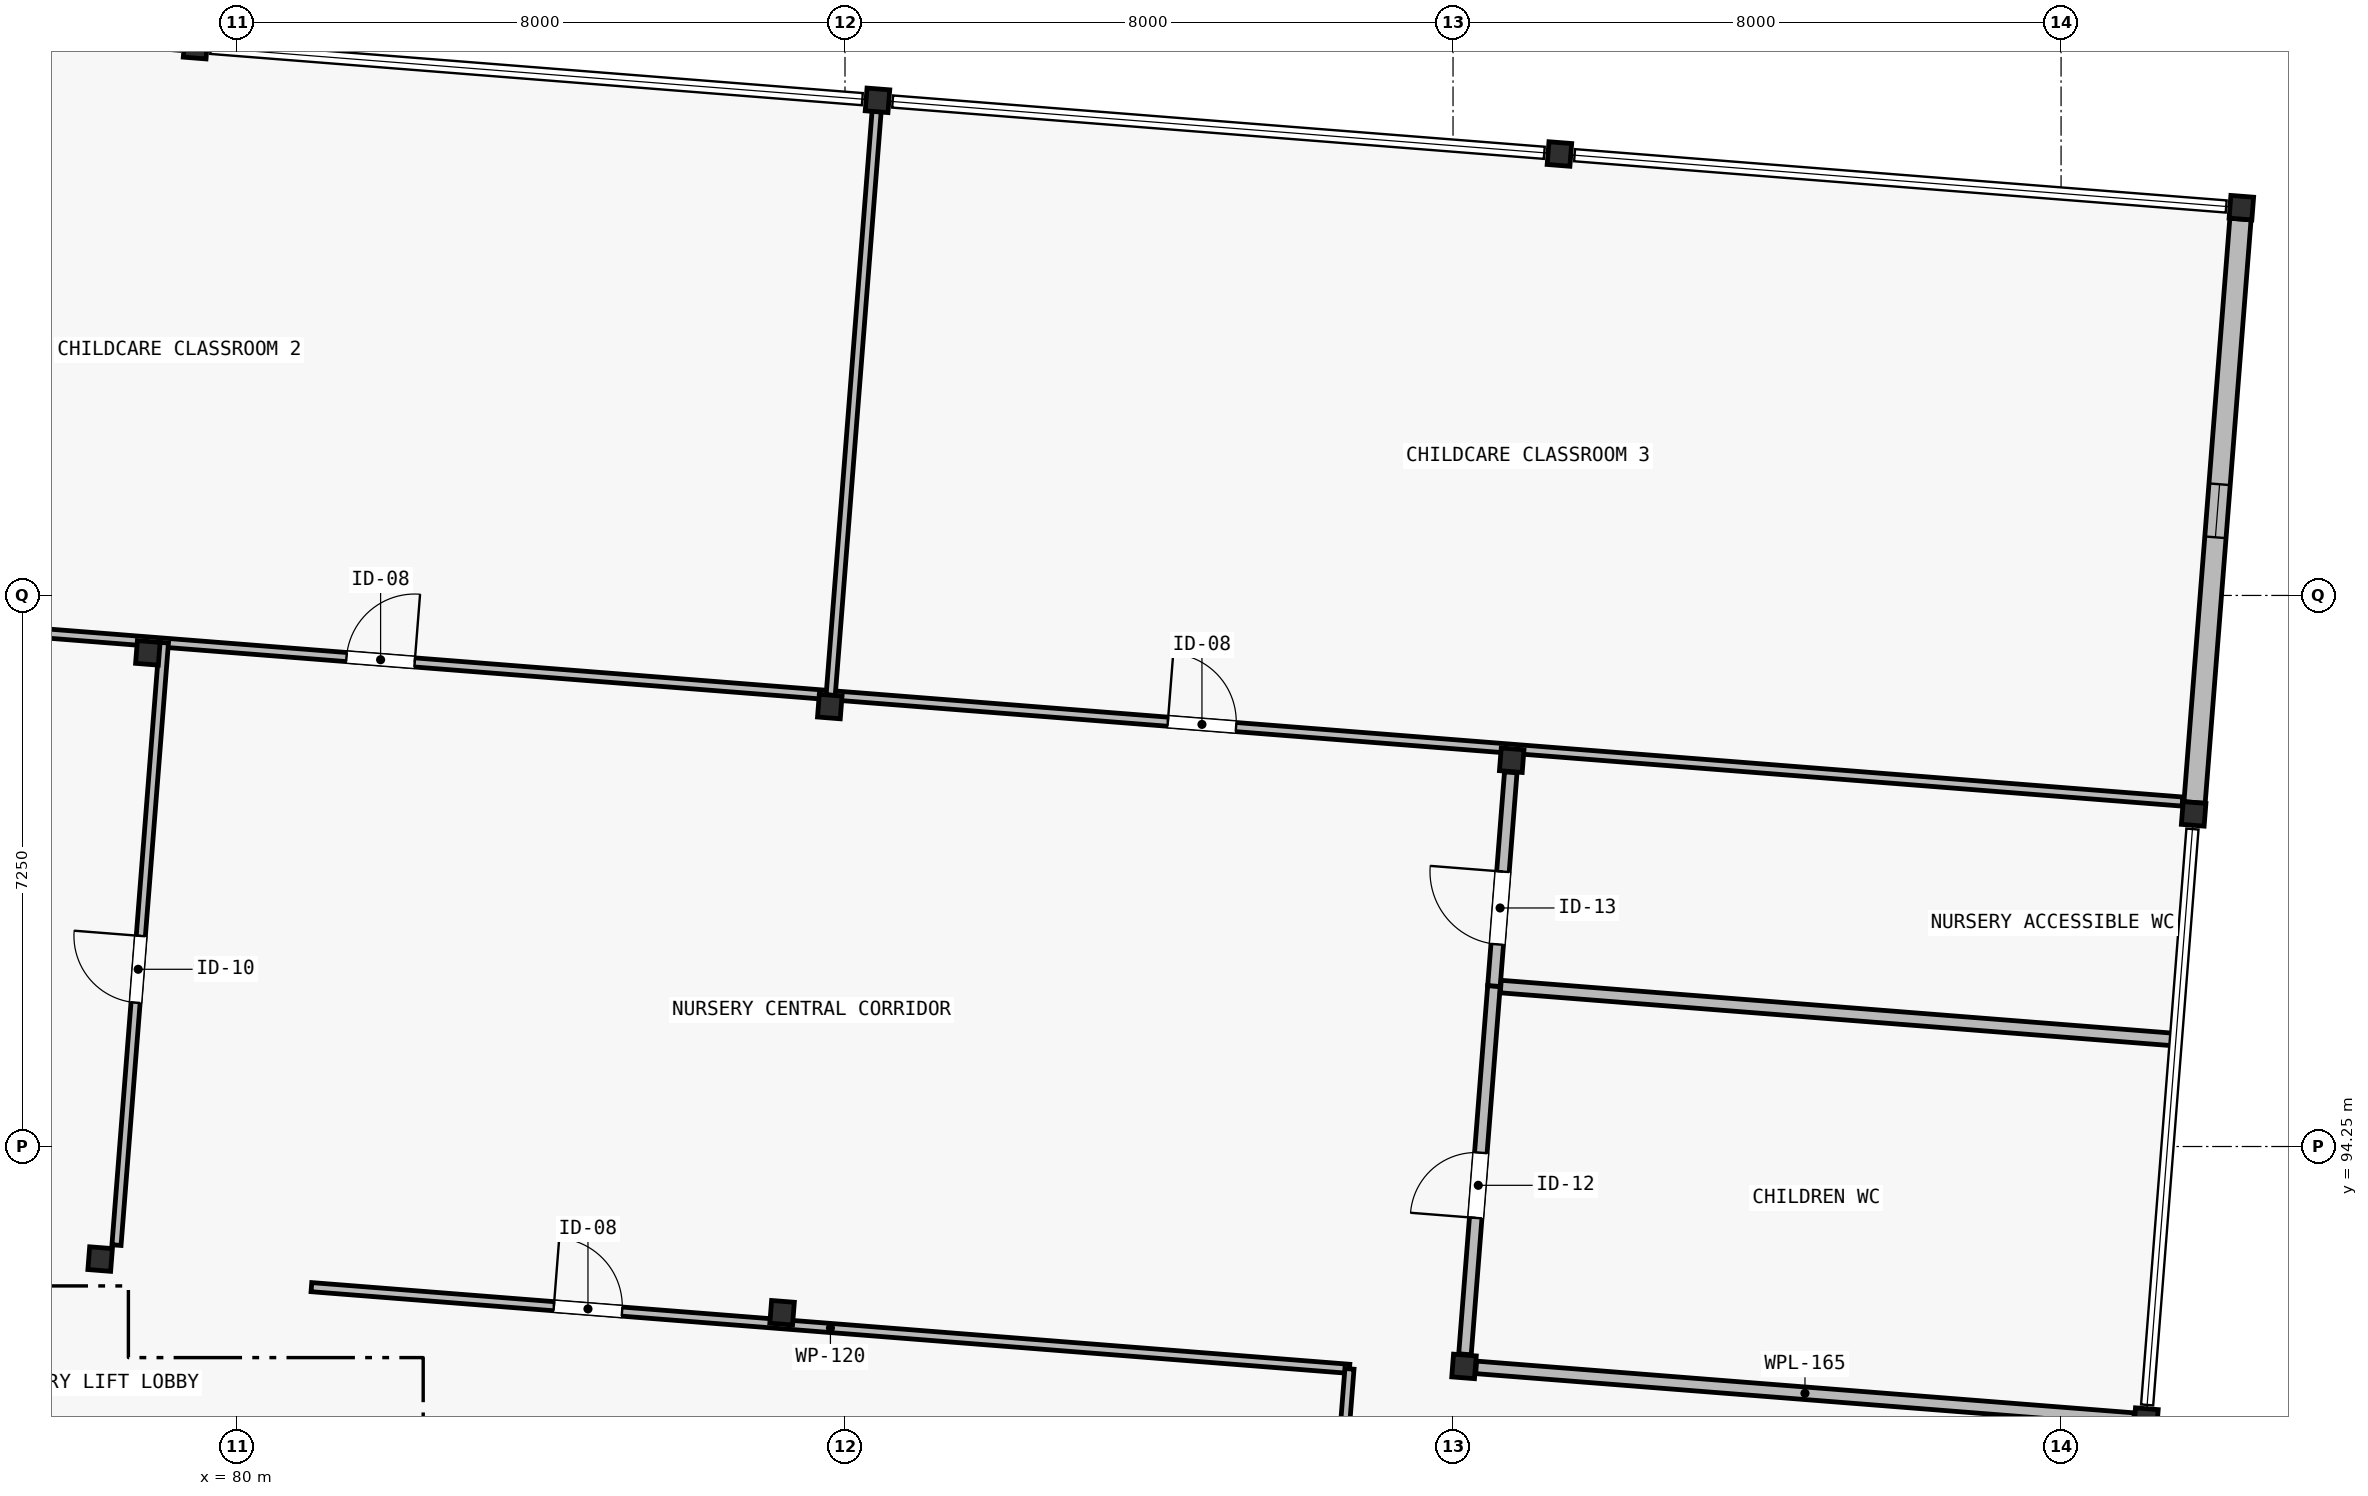
"""IFC4 building model, lengths in metres.
Left out: names, types, materials, properties, quantities, classifications, styles, units other than length and angle.
Written with IfcOpenShell. Run it as: python <this file> out.ifc"""

import sys

from ifc_helpers import new_model, si_unit, direction, frame, frame_2d, origin, origin_2d, place, context, subcontext, project, spatial, rectangle, hollow_rectangle, extrude, element, fill, save


model = new_model("IFC4")
c1 = context("Model", 3, precision=1e-05, world=origin(), true_north=direction((0.0, 1.0)))
c2 = subcontext(c1, "Body", "Model", "MODEL_VIEW")
j1 = project(units=[si_unit("LENGTHUNIT", "METRE"), si_unit("PLANEANGLEUNIT", "RADIAN")], contexts=[c1])
p1 = place(None, origin())
s1 = spatial("IfcSite", under=j1, at=p1, CompositionType="ELEMENT")
p2 = place(p1, origin())
s2 = spatial("IfcBuilding", under=s1, at=p2, CompositionType="ELEMENT")
p3 = place(p2, frame((0.0, 0.0, 4.5)))
s3 = spatial("IfcBuildingStorey", under=s2, at=p3, CompositionType="ELEMENT", Elevation=4.5)
for number, where, z_axis, x_axis in (
    (1, (78.2, 92.769, 0.0), (0.0, 0.0, 1.0), (0.997, -0.078, 0.0)),
    (2, (78.828, 100.745, 0.0), (0.0, 0.0, 1.0), (0.997, -0.078, 0.0)),
    (3, (79.455, 108.72, 0.0), (0.0, 0.0, 1.0), (0.997, -0.078, 0.0)),
    (4, (87.172, 92.063, 0.0), (0.0, 0.0, 1.0), (0.997, -0.078, 0.0)),
    (5, (87.8, 100.038, 0.0), (0.0, 0.0, 1.0), (0.997, -0.078, 0.0)),
    (6, (88.427, 108.014, 0.0), (0.0, 0.0, 1.0), (0.997, -0.078, 0.0)),
    (7, (96.145, 91.357, 0.0), (0.0, 0.0, 1.0), (0.997, -0.078, 0.0)),
    (8, (96.772, 99.332, 0.0), (0.0, 0.0, 1.0), (0.997, -0.078, 0.0)),
    (9, (97.4, 107.308, 0.0), (0.0, 0.0, 1.0), (0.997, -0.078, 0.0)),
    (10, (105.117, 90.651, 0.0), (0.0, 0.0, 1.0), (0.997, -0.078, 0.0)),
    (11, (105.744, 98.626, 0.0), (0.0, 0.0, 1.0), (0.997, -0.078, 0.0)),
    (12, (106.372, 106.602, 0.0), (0.0, 0.0, 1.0), (0.997, -0.078, 0.0)),
):
    element("IfcColumn", number, at=place(p3, frame(where, z_axis=z_axis, x_axis=x_axis)), inside=s3, PredefinedType="COLUMN", context=c2, shape_type="SweptSolid", body=[
        extrude(hollow_rectangle(XDim=0.3, YDim=0.3, WallThickness=0.016, at=origin_2d()), origin(), (0.0, 0.0, 1.0), 3.9),
    ])
p4 = place(p3, frame((106.36, 106.452, 0.0), z_axis=(0.0, 0.0, 1.0), x_axis=(-0.078473620365, -0.996916190513, 0.0)))
e13 = element("IfcWall", 13, at=p4, inside=s3, PredefinedType="SOLIDWALL", context=c2, shape_type="SweptSolid", body=[
    extrude(rectangle(XDim=7.7, YDim=0.28, at=frame_2d((3.85, 0.0))), origin(), (0.0, 0.0, 1.0), 3.23),
])
p5 = place(p4, frame((3.5, 0.0, 0.45)))
e14 = element("IfcOpeningElement", 14, at=p5, cuts=e13, PredefinedType="OPENING", context=c2, shape_type="SweptSolid", body=[
    extrude(rectangle(XDim=0.7, YDim=2.14, at=frame_2d((0.35, 1.07))), frame((0.0, 0.155, 0.0), z_axis=(0.0, -1.0, 0.0), x_axis=(1.0, 0.0, 0.0)), (0.0, 0.0, 1.0), 0.31),
])
p6 = place(p3, frame((80.979, 92.4, 0.0), z_axis=(0.0, 0.0, 1.0), x_axis=(0.996918352409, -0.078446151144, 0.0)))
e15 = element("IfcWall", 15, at=p6, inside=s3, PredefinedType="PARTITIONING", context=c2, shape_type="SweptSolid", body=[
    extrude(rectangle(XDim=13.7, YDim=0.12, at=frame_2d((6.85, 0.0))), origin(), (0.0, 0.0, 1.0), 3.244),
])
p7 = place(p6, frame((3.2, 0.0, 0.0)))
e16 = element("IfcOpeningElement", 16, at=p7, cuts=e15, PredefinedType="OPENING", context=c2, shape_type="SweptSolid", body=[
    extrude(rectangle(XDim=0.9, YDim=2.1, at=frame_2d((0.45, 1.05))), frame((0.0, 0.075, 0.0), z_axis=(0.0, -1.0, 0.0), x_axis=(1.0, 0.0, 0.0)), (0.0, 0.0, 1.0), 0.15),
])
p8 = place(p3, frame((94.033, 83.649, 0.0), z_axis=(0.0, 0.0, 1.0), x_axis=(0.078442108986, 0.996918670473, 0.0)))
e17 = element("IfcWall", 17, at=p8, inside=s3, PredefinedType="PARTITIONING", context=c2, shape_type="SweptSolid", body=[
    extrude(rectangle(XDim=7.7, YDim=0.12, at=frame_2d((3.85, 0.0))), origin(), (0.0, 0.0, 1.0), 3.63),
])
p9 = place(p3, frame((70.027, 101.588, 0.0), z_axis=(0.0, 0.0, 1.0), x_axis=(0.996917529869, -0.078456603549, 0.0)))
e18 = element("IfcWall", 18, at=p9, inside=s3, PredefinedType="PARTITIONING", context=c2, shape_type="SweptSolid", body=[
    extrude(rectangle(XDim=17.84, YDim=0.12, at=frame_2d((8.92, 0.0))), origin(), (0.0, 0.0, 1.0), 3.244),
])
p10 = place(p9, frame((11.45, 0.0, 0.0)))
e19 = element("IfcOpeningElement", 19, at=p10, cuts=e18, PredefinedType="OPENING", context=c2, shape_type="SweptSolid", body=[
    extrude(rectangle(XDim=0.9, YDim=2.1, at=frame_2d((0.45, 1.05))), frame((0.0, 0.075, 0.0), z_axis=(0.0, -1.0, 0.0), x_axis=(1.0, 0.0, 0.0)), (0.0, 0.0, 1.0), 0.15),
])
p11 = place(p3, frame((87.812, 100.188, 0.0), z_axis=(0.0, 0.0, 1.0), x_axis=(0.996917614105, -0.078455533188, 0.0)))
e20 = element("IfcWall", 20, at=p11, inside=s3, PredefinedType="PARTITIONING", context=c2, shape_type="SweptSolid", body=[
    extrude(rectangle(XDim=17.84, YDim=0.12, at=frame_2d((8.92, 0.0))), origin(), (0.0, 0.0, 1.0), 3.244),
])
p12 = place(p11, frame((4.45, 0.0, 0.0)))
e21 = element("IfcOpeningElement", 21, at=p12, cuts=e20, PredefinedType="OPENING", context=c2, shape_type="SweptSolid", body=[
    extrude(rectangle(XDim=0.9, YDim=2.1, at=frame_2d((0.45, 1.05))), frame((0.0, 0.075, 0.0), z_axis=(0.0, -1.0, 0.0), x_axis=(1.0, 0.0, 0.0)), (0.0, 0.0, 1.0), 0.15),
])
p13 = place(p3, frame((78.415, 92.953, 0.0), z_axis=(0.0, 0.0, 1.0), x_axis=(0.078462345875, 0.996917077936, 0.0)))
e22 = element("IfcWall", 22, at=p13, inside=s3, PredefinedType="PARTITIONING", context=c2, shape_type="SweptSolid", body=[
    extrude(rectangle(XDim=7.95, YDim=0.12, at=frame_2d((3.975, 0.0))), origin(), (0.0, 0.0, 1.0), 3.244),
])
p14 = place(p13, frame((3.2, 0.0, 0.0)))
e23 = element("IfcOpeningElement", 23, at=p14, cuts=e22, PredefinedType="OPENING", context=c2, shape_type="SweptSolid", body=[
    extrude(rectangle(XDim=0.88, YDim=2.1, at=frame_2d((0.44, 1.05))), frame((0.0, 0.075, 0.0), z_axis=(0.0, -1.0, 0.0), x_axis=(1.0, 0.0, 0.0)), (0.0, 0.0, 1.0), 0.15),
])
p15 = place(p3, frame((96.304, 91.344, 0.0), z_axis=(0.0, 0.0, 1.0), x_axis=(0.9969162409, -0.078472980254, 0.0)))
e24 = element("IfcWall", 24, at=p15, inside=s3, PredefinedType="PLUMBINGWALL", context=c2, shape_type="SweptSolid", body=[
    extrude(rectangle(XDim=8.68, YDim=0.165, at=frame_2d((4.34, 0.0))), origin(), (0.0, 0.0, 1.0), 3.244),
])
p16 = place(p3, frame((96.157, 91.516, 0.0), z_axis=(0.0, 0.0, 1.0), x_axis=(0.078463385465, 0.996916996114, 0.0)))
e25 = element("IfcWall", 25, at=p16, inside=s3, PredefinedType="PLUMBINGWALL", context=c2, shape_type="SweptSolid", body=[
    extrude(rectangle(XDim=4.86, YDim=0.165, at=frame_2d((2.43, 0.0))), origin(), (0.0, 0.0, 1.0), 3.244),
])
p17 = place(p16, frame((1.8, 0.0, 0.0)))
e26 = element("IfcOpeningElement", 26, at=p17, cuts=e25, PredefinedType="OPENING", context=c2, shape_type="SweptSolid", body=[
    extrude(rectangle(XDim=0.86, YDim=2.1, at=frame_2d((0.43, 1.05))), frame((0.0, 0.097, 0.0), z_axis=(0.0, -1.0, 0.0), x_axis=(1.0, 0.0, 0.0)), (0.0, 0.0, 1.0), 0.195),
])
p18 = place(p3, frame((96.538, 96.362, 0.0), z_axis=(0.0, 0.0, 1.0), x_axis=(0.078437571766, 0.996919027472, 0.0)))
e27 = element("IfcWall", 27, at=p18, inside=s3, PredefinedType="PLUMBINGWALL", context=c2, shape_type="SweptSolid", body=[
    extrude(rectangle(XDim=2.82, YDim=0.165, at=frame_2d((1.41, 0.0))), origin(), (0.0, 0.0, 1.0), 3.244),
])
p19 = place(p18, frame((0.55, 0.0, 0.0)))
e28 = element("IfcOpeningElement", 28, at=p19, cuts=e27, PredefinedType="OPENING", context=c2, shape_type="SweptSolid", body=[
    extrude(rectangle(XDim=0.96, YDim=2.12, at=frame_2d((0.48, 1.06))), frame((0.0, 0.097, 0.0), z_axis=(0.0, -1.0, 0.0), x_axis=(1.0, 0.0, 0.0)), (0.0, 0.0, 1.0), 0.195),
])
p20 = place(p3, frame((87.812, 100.188, 0.0), z_axis=(0.0, 0.0, 1.0), x_axis=(0.078462944011, 0.996917030859, 0.0)))
e29 = element("IfcWall", 29, at=p20, inside=s3, PredefinedType="PARTITIONING", context=c2, shape_type="SweptSolid", body=[
    extrude(rectangle(XDim=7.81, YDim=0.12, at=frame_2d((3.905, 0.0))), origin(), (0.0, 0.0, 1.0), 3.244),
])
p21 = place(p3, frame((96.628, 96.354, 0.0), z_axis=(0.0, 0.0, 1.0), x_axis=(0.996916420474, -0.078470698917, 0.0)))
e30 = element("IfcWall", 30, at=p21, inside=s3, PredefinedType="PLUMBINGWALL", context=c2, shape_type="SweptSolid", body=[
    extrude(rectangle(XDim=8.87, YDim=0.165, at=frame_2d((4.435, 0.0))), origin(), (0.0, 0.0, 1.0), 3.63),
])
p22 = place(p5, origin())
e31 = element("IfcWindow", 31, at=p22, inside=s3, PartitioningType="SINGLE_PANEL", PredefinedType="WINDOW", context=c2, shape_type="SweptSolid", body=[
    extrude(rectangle(XDim=0.7, YDim=2.14, at=frame_2d((0.35, 1.07))), frame((0.0, 0.03, 0.0), z_axis=(0.0, -1.0, 0.0), x_axis=(1.0, 0.0, 0.0)), (0.0, 0.0, 1.0), 0.06),
])
fill(e14, e31)
p23 = place(p7, origin())
e32 = element("IfcDoor", 32, at=p23, inside=s3, OperationType="SINGLE_SWING_LEFT", PredefinedType="DOOR", context=c2, shape_type="SweptSolid", body=[
    extrude(rectangle(XDim=0.9, YDim=2.1, at=frame_2d((0.45, 1.05))), frame((0.0, 0.025, 0.0), z_axis=(0.0, -1.0, 0.0), x_axis=(1.0, 0.0, 0.0)), (0.0, 0.0, 1.0), 0.05),
])
fill(e16, e32)
p24 = place(p10, origin())
e33 = element("IfcDoor", 33, at=p24, inside=s3, OperationType="SINGLE_SWING_RIGHT", PredefinedType="DOOR", context=c2, shape_type="SweptSolid", body=[
    extrude(rectangle(XDim=0.9, YDim=2.1, at=frame_2d((0.45, 1.05))), frame((0.0, 0.025, 0.0), z_axis=(0.0, -1.0, 0.0), x_axis=(1.0, 0.0, 0.0)), (0.0, 0.0, 1.0), 0.05),
])
fill(e19, e33)
p25 = place(p12, origin())
e34 = element("IfcDoor", 34, at=p25, inside=s3, OperationType="SINGLE_SWING_LEFT", PredefinedType="DOOR", context=c2, shape_type="SweptSolid", body=[
    extrude(rectangle(XDim=0.9, YDim=2.1, at=frame_2d((0.45, 1.05))), frame((0.0, 0.025, 0.0), z_axis=(0.0, -1.0, 0.0), x_axis=(1.0, 0.0, 0.0)), (0.0, 0.0, 1.0), 0.05),
])
fill(e21, e34)
p26 = place(p14, origin())
e35 = element("IfcDoor", 35, at=p26, inside=s3, OperationType="SINGLE_SWING_RIGHT", PredefinedType="DOOR", context=c2, shape_type="SweptSolid", body=[
    extrude(rectangle(XDim=0.88, YDim=2.1, at=frame_2d((0.44, 1.05))), frame((0.0, 0.025, 0.0), z_axis=(0.0, -1.0, 0.0), x_axis=(1.0, 0.0, 0.0)), (0.0, 0.0, 1.0), 0.05),
])
fill(e23, e35)
p27 = place(p17, origin())
e36 = element("IfcDoor", 36, at=p27, inside=s3, OperationType="SINGLE_SWING_LEFT", PredefinedType="DOOR", context=c2, shape_type="SweptSolid", body=[
    extrude(rectangle(XDim=0.86, YDim=2.1, at=frame_2d((0.43, 1.05))), frame((0.0, 0.025, 0.0), z_axis=(0.0, -1.0, 0.0), x_axis=(1.0, 0.0, 0.0)), (0.0, 0.0, 1.0), 0.05),
])
fill(e26, e36)
p28 = place(p19, origin())
e37 = element("IfcDoor", 37, at=p28, inside=s3, OperationType="SINGLE_SWING_RIGHT", PredefinedType="DOOR", context=c2, shape_type="SweptSolid", body=[
    extrude(rectangle(XDim=0.96, YDim=2.12, at=frame_2d((0.48, 1.06))), frame((0.0, 0.025, 0.0), z_axis=(0.0, -1.0, 0.0), x_axis=(1.0, 0.0, 0.0)), (0.0, 0.0, 1.0), 0.05),
])
fill(e28, e37)
save(model, sys.argv[1])
